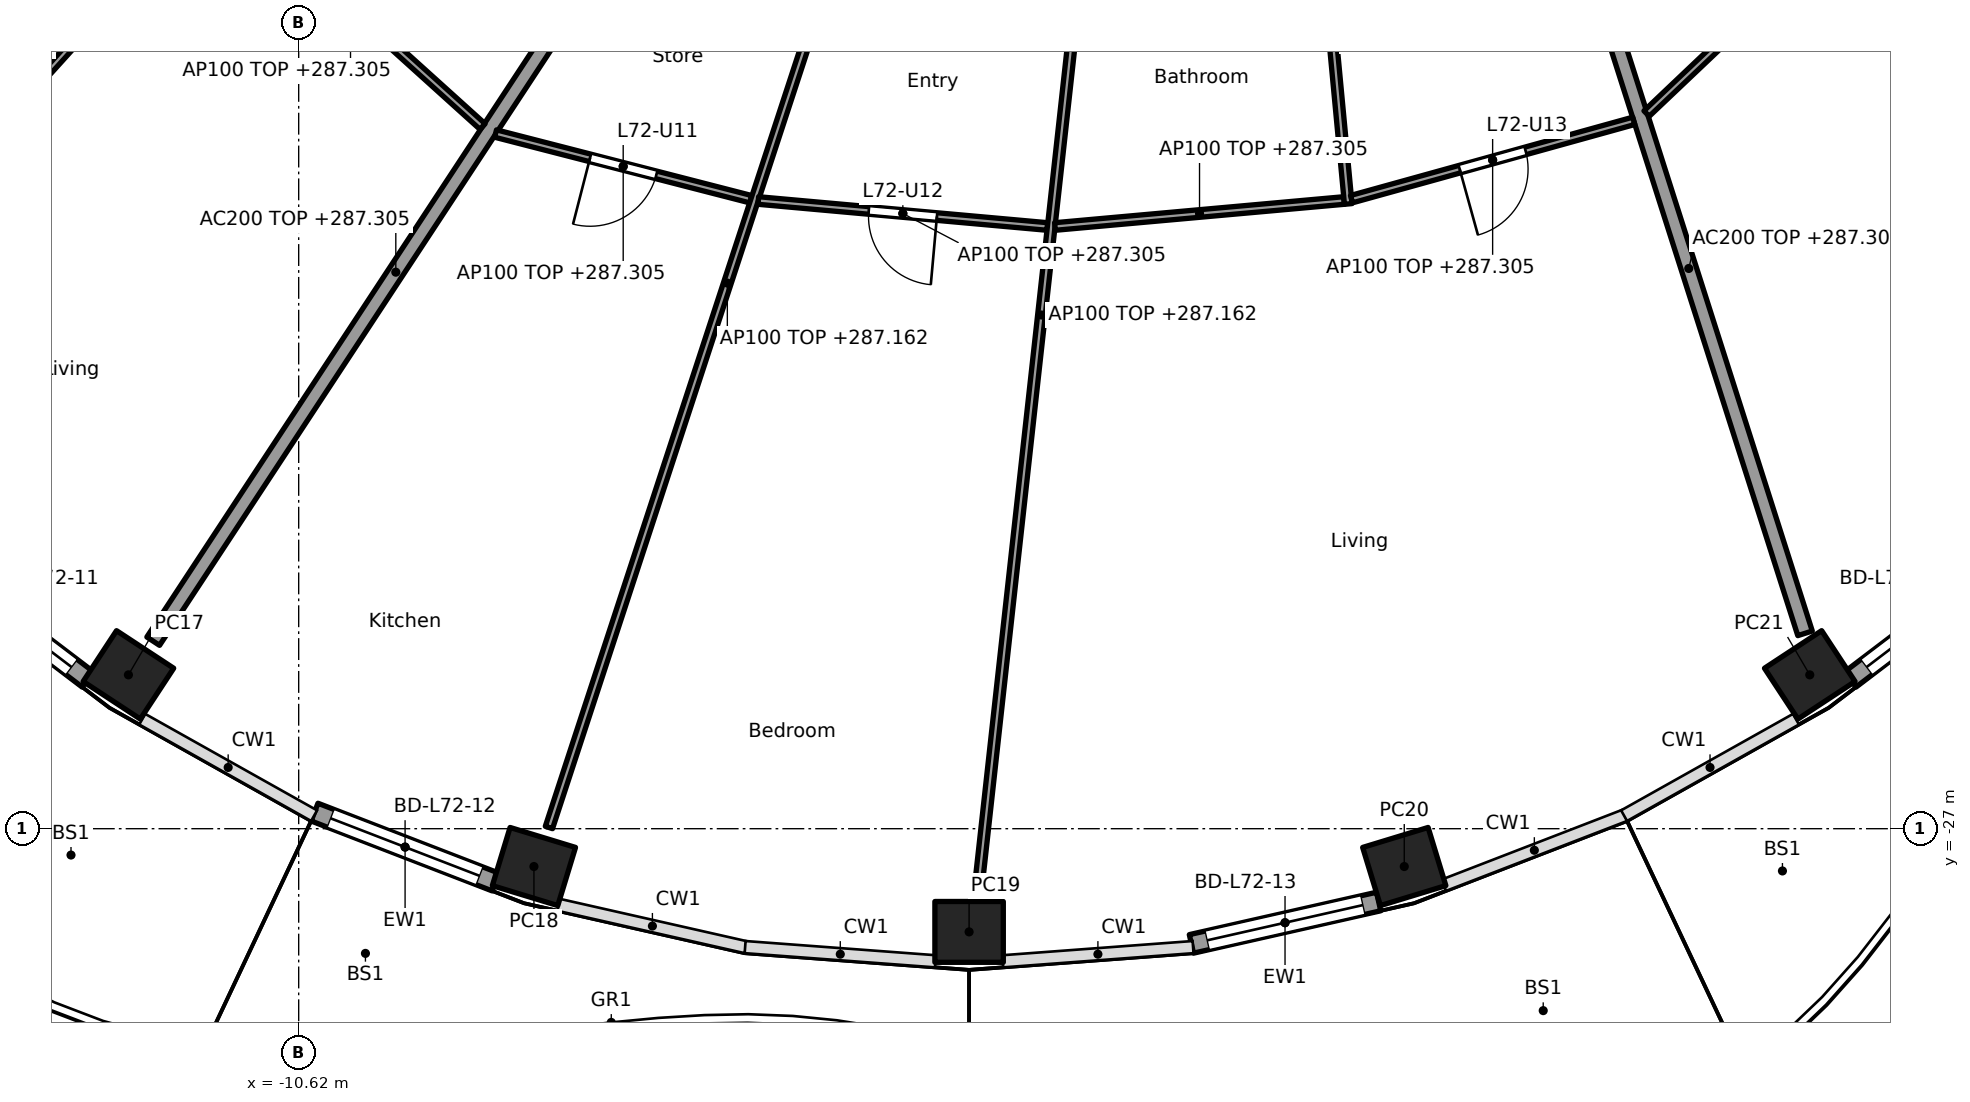
"""IFC4 building model, lengths in metres.
Left out: names, types, materials, properties, quantities, classifications, styles, units other than length and angle.
Written with IfcOpenShell. Run it as: python <this file> out.ifc"""

import sys

from ifc_helpers import new_model, si_unit, direction, frame, frame_2d, origin, origin_2d, place, context, subcontext, project, spatial, rectangle, hollow_rectangle, extrude, element, fill, save


model = new_model("IFC4")
c1 = context("Model", 3, precision=1e-05, world=origin(), true_north=direction((0.0, 1.0)))
c2 = subcontext(c1, "Body", "Model", "MODEL_VIEW")
j1 = project(units=[si_unit("LENGTHUNIT", "METRE"), si_unit("PLANEANGLEUNIT", "RADIAN")], contexts=[c1])
p1 = place(None, origin())
s1 = spatial("IfcSite", under=j1, at=p1, CompositionType="ELEMENT")
p2 = place(p1, origin())
s2 = spatial("IfcBuilding", under=s1, at=p2, CompositionType="ELEMENT")
p3 = place(p2, frame((0.0, 0.0, 284.4)))
s3 = spatial("IfcBuildingStorey", under=s2, at=p3, CompositionType="ELEMENT", Elevation=284.4)
for number, where, z_axis, x_axis in (
    (1, (-12.86, -24.976, 0.0), (0.0, 0.0, 1.0), (0.836, -0.549, 0.0)),
    (2, (-7.525, -27.498, 0.0), (0.0, 0.0, 1.0), (0.957, -0.292, 0.0)),
    (3, (-1.8, -28.358, 0.0), (0.0, 0.0, 1.0), (1.0, 0.0, 0.0)),
    (4, (3.925, -27.498, 0.0), (0.0, 0.0, 1.0), (0.957, 0.292, 0.0)),
    (5, (9.26, -24.976, 0.0), (0.0, 0.0, 1.0), (0.836, 0.549, 0.0)),
):
    element("IfcColumn", number, at=place(p3, frame(where, z_axis=z_axis, x_axis=x_axis)), inside=s3, PredefinedType="COLUMN", context=c2, shape_type="SweptSolid", body=[
        extrude(hollow_rectangle(XDim=0.9, YDim=0.8, WallThickness=0.028, at=origin_2d()), origin(), (0.0, 0.0, 1.0), 3.7),
    ])
p4 = place(p3, frame((-13.393, -25.037, 0.0), z_axis=(0.0, 0.0, 1.0), x_axis=(-0.796055284084, 0.605223912847, 0.0)))
e6 = element("IfcWall", 6, at=p4, inside=s3, PredefinedType="SOLIDWALL", context=c2, shape_type="SweptSolid", body=[
    extrude(rectangle(XDim=2.641, YDim=0.25, at=frame_2d((1.32, 0.0))), origin(), (0.0, 0.0, 1.0), 3.44),
])
p5 = place(p4, frame((0.27, 0.0, 0.0)))
e7 = element("IfcOpeningElement", 7, at=p5, cuts=e6, PredefinedType="OPENING", context=c2, shape_type="SweptSolid", body=[
    extrude(rectangle(XDim=2.1, YDim=2.4, at=frame_2d((1.05, 1.2))), frame((0.0, 0.135, 0.0), z_axis=(0.0, -1.0, 0.0), x_axis=(1.0, 0.0, 0.0)), (0.0, 0.0, 1.0), 0.27),
])
p6 = place(p3, frame((-8.029, -27.702, 0.0), z_axis=(0.0, 0.0, 1.0), x_axis=(-0.93282223778, 0.360336887792, 0.0)))
e8 = element("IfcWall", 8, at=p6, inside=s3, PredefinedType="SOLIDWALL", context=c2, shape_type="SweptSolid", body=[
    extrude(rectangle(XDim=2.554, YDim=0.25, at=frame_2d((1.277, 0.0))), origin(), (0.0, 0.0, 1.0), 3.44),
])
p7 = place(p6, frame((0.227, 0.0, 0.0)))
e9 = element("IfcOpeningElement", 9, at=p7, cuts=e8, PredefinedType="OPENING", context=c2, shape_type="SweptSolid", body=[
    extrude(rectangle(XDim=2.1, YDim=2.4, at=frame_2d((1.05, 1.2))), frame((0.0, 0.135, 0.0), z_axis=(0.0, -1.0, 0.0), x_axis=(1.0, 0.0, 0.0)), (0.0, 0.0, 1.0), 0.27),
])
p8 = place(p3, frame((3.588, -27.958, 0.0), z_axis=(0.0, 0.0, 1.0), x_axis=(-0.97531487046, -0.22081871175, 0.0)))
e10 = element("IfcWall", 10, at=p8, inside=s3, PredefinedType="SOLIDWALL", context=c2, shape_type="SweptSolid", body=[
    extrude(rectangle(XDim=2.525, YDim=0.25, at=frame_2d((1.263, 0.0))), origin(), (0.0, 0.0, 1.0), 3.44),
])
p9 = place(p8, frame((0.213, 0.0, 0.0)))
e11 = element("IfcOpeningElement", 11, at=p9, cuts=e10, PredefinedType="OPENING", context=c2, shape_type="SweptSolid", body=[
    extrude(rectangle(XDim=2.1, YDim=2.4, at=frame_2d((1.05, 1.2))), frame((0.0, 0.135, 0.0), z_axis=(0.0, -1.0, 0.0), x_axis=(1.0, 0.0, 0.0)), (0.0, 0.0, 1.0), 0.27),
])
p10 = place(p3, frame((11.895, -23.439, 0.0), z_axis=(0.0, 0.0, 1.0), x_axis=(-0.796055284084, -0.605223912847, 0.0)))
e12 = element("IfcWall", 12, at=p10, inside=s3, PredefinedType="SOLIDWALL", context=c2, shape_type="SweptSolid", body=[
    extrude(rectangle(XDim=2.641, YDim=0.25, at=frame_2d((1.32, 0.0))), origin(), (0.0, 0.0, 1.0), 3.44),
])
p11 = place(p10, frame((0.27, 0.0, 0.0)))
e13 = element("IfcOpeningElement", 13, at=p11, cuts=e12, PredefinedType="OPENING", context=c2, shape_type="SweptSolid", body=[
    extrude(rectangle(XDim=2.1, YDim=2.4, at=frame_2d((1.05, 1.2))), frame((0.0, 0.135, 0.0), z_axis=(0.0, -1.0, 0.0), x_axis=(1.0, 0.0, 0.0)), (0.0, 0.0, 1.0), 0.27),
])
p12 = place(p3, frame((-6.151, -14.824, 0.0), z_axis=(0.0, 0.0, 1.0), x_axis=(-0.549345577828, -0.835595258556, 0.0)))
e14 = element("IfcWall", 14, at=p12, inside=s3, PredefinedType="PARTITIONING", context=c2, shape_type="SweptSolid", body=[
    extrude(rectangle(XDim=11.62, YDim=0.2, at=frame_2d((5.81, 0.0))), origin(), (0.0, 0.0, 1.0), 2.905),
])
p13 = place(p3, frame((6.138, -14.83, 0.0), z_axis=(0.0, 0.0, 1.0), x_axis=(0.303653679037, -0.952782474234, 0.0)))
e15 = element("IfcWall", 15, at=p13, inside=s3, PredefinedType="PARTITIONING", context=c2, shape_type="SweptSolid", body=[
    extrude(rectangle(XDim=10.076, YDim=0.2, at=frame_2d((5.038, 0.0))), origin(), (0.0, 0.0, 1.0), 2.905),
])
p14 = place(p3, frame((-11.679, -14.557, 0.0), z_axis=(0.0, 0.0, 1.0), x_axis=(-0.670800011545, -0.741638284146, 0.0)))
e16 = element("IfcWall", 16, at=p14, inside=s3, PredefinedType="PARTITIONING", context=c2, shape_type="SweptSolid", body=[
    extrude(rectangle(XDim=8.068, YDim=0.1, at=frame_2d((4.034, 0.0))), origin(), (0.0, 0.0, 1.0), 2.905),
])
p15 = place(p3, frame((-11.676, -14.628, 0.0), z_axis=(0.0, 0.0, 1.0), x_axis=(0.74245829867, -0.669892285921, 0.0)))
e17 = element("IfcWall", 17, at=p15, inside=s3, PredefinedType="PARTITIONING", context=c2, shape_type="SweptSolid", body=[
    extrude(rectangle(XDim=4.68, YDim=0.1, at=frame_2d((2.34, 0.0))), origin(), (0.0, 0.0, 1.0), 2.905),
])
p16 = place(p15, frame((0.732, 0.0, 0.0)))
e18 = element("IfcOpeningElement", 18, at=p16, cuts=e17, PredefinedType="OPENING", context=c2, shape_type="SweptSolid", body=[
    extrude(rectangle(XDim=0.9, YDim=2.1, at=frame_2d((0.45, 1.05))), frame((0.0, 0.06, 0.0), z_axis=(0.0, -1.0, 0.0), x_axis=(1.0, 0.0, 0.0)), (0.0, 0.0, 1.0), 0.12),
])
p17 = place(p3, frame((-8.03, -17.854, 0.0), z_axis=(0.0, 0.0, 1.0), x_axis=(0.968441967324, -0.249239154077, 0.0)))
e19 = element("IfcWall", 19, at=p17, inside=s3, PredefinedType="PARTITIONING", context=c2, shape_type="SweptSolid", body=[
    extrude(rectangle(XDim=3.468, YDim=0.1, at=frame_2d((1.734, 0.0))), origin(), (0.0, 0.0, 1.0), 2.905),
])
p18 = place(p17, frame((1.284, 0.0, 0.0)))
e20 = element("IfcOpeningElement", 20, at=p18, cuts=e19, PredefinedType="OPENING", context=c2, shape_type="SweptSolid", body=[
    extrude(rectangle(XDim=0.9, YDim=2.1, at=frame_2d((0.45, 1.05))), frame((0.0, 0.06, 0.0), z_axis=(0.0, -1.0, 0.0), x_axis=(1.0, 0.0, 0.0)), (0.0, 0.0, 1.0), 0.12),
])
p19 = place(p3, frame((-2.633, -12.66, 0.0), z_axis=(0.0, 0.0, 1.0), x_axis=(-0.311432955908, -0.950268127412, 0.0)))
e21 = element("IfcWall", 21, at=p19, inside=s3, PredefinedType="PARTITIONING", context=c2, shape_type="SweptSolid", body=[
    extrude(rectangle(XDim=15.074, YDim=0.1, at=frame_2d((7.537, 0.0))), origin(), (0.0, 0.0, 1.0), 2.762),
])
p20 = place(p19, frame((0.829, 0.0, 0.0)))
e22 = element("IfcOpeningElement", 22, at=p20, cuts=e21, PredefinedType="OPENING", context=c2, shape_type="SweptSolid", body=[
    extrude(rectangle(XDim=0.9, YDim=2.1, at=frame_2d((0.45, 1.05))), frame((0.0, 0.06, 0.0), z_axis=(0.0, -1.0, 0.0), x_axis=(1.0, 0.0, 0.0)), (0.0, 0.0, 1.0), 0.12),
])
p21 = place(p3, frame((-4.573, -18.736, 0.0), z_axis=(0.0, 0.0, 1.0), x_axis=(0.995986472869, -0.089503887414, 0.0)))
e23 = element("IfcWall", 23, at=p21, inside=s3, PredefinedType="PARTITIONING", context=c2, shape_type="SweptSolid", body=[
    extrude(rectangle(XDim=3.819, YDim=0.1, at=frame_2d((1.909, 0.0))), origin(), (0.0, 0.0, 1.0), 2.905),
])
p22 = place(p21, frame((1.459, 0.0, 0.0)))
e24 = element("IfcOpeningElement", 24, at=p22, cuts=e23, PredefinedType="OPENING", context=c2, shape_type="SweptSolid", body=[
    extrude(rectangle(XDim=0.9, YDim=2.1, at=frame_2d((0.45, 1.05))), frame((0.0, 0.06, 0.0), z_axis=(0.0, -1.0, 0.0), x_axis=(1.0, 0.0, 0.0)), (0.0, 0.0, 1.0), 0.12),
])
p23 = place(p3, frame((-0.011, -12.664, 0.0), z_axis=(0.0, 0.0, 1.0), x_axis=(-0.109805889692, -0.993953050495, 0.0)))
e25 = element("IfcWall", 25, at=p23, inside=s3, PredefinedType="PARTITIONING", context=c2, shape_type="SweptSolid", body=[
    extrude(rectangle(XDim=15.248, YDim=0.1, at=frame_2d((7.624, 0.0))), origin(), (0.0, 0.0, 1.0), 2.762),
])
p24 = place(p23, frame((2.778, 0.0, 0.0)))
e26 = element("IfcOpeningElement", 26, at=p24, cuts=e25, PredefinedType="OPENING", context=c2, shape_type="SweptSolid", body=[
    extrude(rectangle(XDim=0.9, YDim=2.1, at=frame_2d((0.45, 1.05))), frame((0.0, 0.06, 0.0), z_axis=(0.0, -1.0, 0.0), x_axis=(1.0, 0.0, 0.0)), (0.0, 0.0, 1.0), 0.12),
])
p25 = place(p3, frame((-0.67, -19.077, 0.0), z_axis=(0.0, 0.0, 1.0), x_axis=(0.995986472869, 0.089503887414, 0.0)))
e27 = element("IfcWall", 27, at=p25, inside=s3, PredefinedType="PARTITIONING", context=c2, shape_type="SweptSolid", body=[
    extrude(rectangle(XDim=3.819, YDim=0.1, at=frame_2d((1.909, 0.0))), origin(), (0.0, 0.0, 1.0), 2.905),
])
p26 = place(p3, frame((2.612, -12.664, 0.0), z_axis=(0.0, 0.0, 1.0), x_axis=(0.093781393779, -0.995592813444, 0.0)))
e28 = element("IfcWall", 28, at=p26, inside=s3, PredefinedType="PARTITIONING", context=c2, shape_type="SweptSolid", body=[
    extrude(rectangle(XDim=6.144, YDim=0.1, at=frame_2d((3.072, 0.0))), origin(), (0.0, 0.0, 1.0), 2.762),
])
p27 = place(p26, frame((2.597, 0.0, 0.0)))
e29 = element("IfcOpeningElement", 29, at=p27, cuts=e28, PredefinedType="OPENING", context=c2, shape_type="SweptSolid", body=[
    extrude(rectangle(XDim=0.9, YDim=2.1, at=frame_2d((0.45, 1.05))), frame((0.0, 0.06, 0.0), z_axis=(0.0, -1.0, 0.0), x_axis=(1.0, 0.0, 0.0)), (0.0, 0.0, 1.0), 0.12),
])
p28 = place(p3, frame((3.231, -18.718, 0.0), z_axis=(0.0, 0.0, 1.0), x_axis=(0.963606817151, 0.267323590318, 0.0)))
e30 = element("IfcWall", 30, at=p28, inside=s3, PredefinedType="PARTITIONING", context=c2, shape_type="SweptSolid", body=[
    extrude(rectangle(XDim=3.853, YDim=0.1, at=frame_2d((1.927, 0.0))), origin(), (0.0, 0.0, 1.0), 2.905),
])
p29 = place(p28, frame((1.477, 0.0, 0.0)))
e31 = element("IfcOpeningElement", 31, at=p29, cuts=e30, PredefinedType="OPENING", context=c2, shape_type="SweptSolid", body=[
    extrude(rectangle(XDim=0.9, YDim=2.1, at=frame_2d((0.45, 1.05))), frame((0.0, 0.06, 0.0), z_axis=(0.0, -1.0, 0.0), x_axis=(1.0, 0.0, 0.0)), (0.0, 0.0, 1.0), 0.12),
])
p30 = place(p3, frame((7.113, -17.592, 0.0), z_axis=(0.0, 0.0, 1.0), x_axis=(0.725433932329, 0.688291805723, 0.0)))
e32 = element("IfcWall", 32, at=p30, inside=s3, PredefinedType="PARTITIONING", context=c2, shape_type="SweptSolid", body=[
    extrude(rectangle(XDim=4.305, YDim=0.1, at=frame_2d((2.153, 0.0))), origin(), (0.0, 0.0, 1.0), 2.905),
])
p31 = place(p3, frame((7.708, -10.198, 0.0), z_axis=(0.0, 0.0, 1.0), x_axis=(0.503839015963, -0.863797572347, 0.0)))
e33 = element("IfcWall", 33, at=p31, inside=s3, PredefinedType="PARTITIONING", context=c2, shape_type="SweptSolid", body=[
    extrude(rectangle(XDim=11.856, YDim=0.1, at=frame_2d((5.928, 0.0))), origin(), (0.0, 0.0, 1.0), 2.762),
])
p32 = place(p31, frame((2.095, 0.0, 0.0)))
e34 = element("IfcOpeningElement", 34, at=p32, cuts=e33, PredefinedType="OPENING", context=c2, shape_type="SweptSolid", body=[
    extrude(rectangle(XDim=0.9, YDim=2.1, at=frame_2d((0.45, 1.05))), frame((0.0, 0.06, 0.0), z_axis=(0.0, -1.0, 0.0), x_axis=(1.0, 0.0, 0.0)), (0.0, 0.0, 1.0), 0.12),
])
p33 = place(p31, frame((8.023, 0.0, 0.0)))
e35 = element("IfcOpeningElement", 35, at=p33, cuts=e33, PredefinedType="OPENING", context=c2, shape_type="SweptSolid", body=[
    extrude(rectangle(XDim=0.9, YDim=2.1, at=frame_2d((0.45, 1.05))), frame((0.0, 0.06, 0.0), z_axis=(0.0, -1.0, 0.0), x_axis=(1.0, 0.0, 0.0)), (0.0, 0.0, 1.0), 0.12),
])
p34 = place(p5, origin())
e36 = element("IfcDoor", 36, at=p34, inside=s3, OperationType="SLIDING_TO_LEFT", PredefinedType="DOOR", context=c2, shape_type="SweptSolid", body=[
    extrude(rectangle(XDim=2.1, YDim=2.4, at=frame_2d((1.05, 1.2))), frame((0.0, 0.025, 0.0), z_axis=(0.0, -1.0, 0.0), x_axis=(1.0, 0.0, 0.0)), (0.0, 0.0, 1.0), 0.05),
])
fill(e7, e36)
p35 = place(p7, origin())
e37 = element("IfcDoor", 37, at=p35, inside=s3, OperationType="SLIDING_TO_LEFT", PredefinedType="DOOR", context=c2, shape_type="SweptSolid", body=[
    extrude(rectangle(XDim=2.1, YDim=2.4, at=frame_2d((1.05, 1.2))), frame((0.0, 0.025, 0.0), z_axis=(0.0, -1.0, 0.0), x_axis=(1.0, 0.0, 0.0)), (0.0, 0.0, 1.0), 0.05),
])
fill(e9, e37)
p36 = place(p9, origin())
e38 = element("IfcDoor", 38, at=p36, inside=s3, OperationType="SLIDING_TO_LEFT", PredefinedType="DOOR", context=c2, shape_type="SweptSolid", body=[
    extrude(rectangle(XDim=2.1, YDim=2.4, at=frame_2d((1.05, 1.2))), frame((0.0, 0.025, 0.0), z_axis=(0.0, -1.0, 0.0), x_axis=(1.0, 0.0, 0.0)), (0.0, 0.0, 1.0), 0.05),
])
fill(e11, e38)
p37 = place(p11, origin())
e39 = element("IfcDoor", 39, at=p37, inside=s3, OperationType="SLIDING_TO_LEFT", PredefinedType="DOOR", context=c2, shape_type="SweptSolid", body=[
    extrude(rectangle(XDim=2.1, YDim=2.4, at=frame_2d((1.05, 1.2))), frame((0.0, 0.025, 0.0), z_axis=(0.0, -1.0, 0.0), x_axis=(1.0, 0.0, 0.0)), (0.0, 0.0, 1.0), 0.05),
])
fill(e13, e39)
p38 = place(p18, frame((0.9, 0.0, 0.0), x_axis=(-1.0, 0.0, 0.0)))
e40 = element("IfcDoor", 40, at=p38, inside=s3, OperationType="SINGLE_SWING_RIGHT", PredefinedType="DOOR", context=c2, shape_type="SweptSolid", body=[
    extrude(rectangle(XDim=0.9, YDim=2.1, at=frame_2d((0.45, 1.05))), frame((0.0, 0.025, 0.0), z_axis=(0.0, -1.0, 0.0), x_axis=(1.0, 0.0, 0.0)), (0.0, 0.0, 1.0), 0.05),
])
fill(e20, e40)
p39 = place(p22, frame((0.9, 0.0, 0.0), x_axis=(-1.0, 0.0, 0.0)))
e41 = element("IfcDoor", 41, at=p39, inside=s3, OperationType="SINGLE_SWING_LEFT", PredefinedType="DOOR", context=c2, shape_type="SweptSolid", body=[
    extrude(rectangle(XDim=0.9, YDim=2.1, at=frame_2d((0.45, 1.05))), frame((0.0, 0.025, 0.0), z_axis=(0.0, -1.0, 0.0), x_axis=(1.0, 0.0, 0.0)), (0.0, 0.0, 1.0), 0.05),
])
fill(e24, e41)
p40 = place(p29, frame((0.9, 0.0, 0.0), x_axis=(-1.0, 0.0, 0.0)))
e42 = element("IfcDoor", 42, at=p40, inside=s3, OperationType="SINGLE_SWING_RIGHT", PredefinedType="DOOR", context=c2, shape_type="SweptSolid", body=[
    extrude(rectangle(XDim=0.9, YDim=2.1, at=frame_2d((0.45, 1.05))), frame((0.0, 0.025, 0.0), z_axis=(0.0, -1.0, 0.0), x_axis=(1.0, 0.0, 0.0)), (0.0, 0.0, 1.0), 0.05),
])
fill(e31, e42)
save(model, sys.argv[1])
